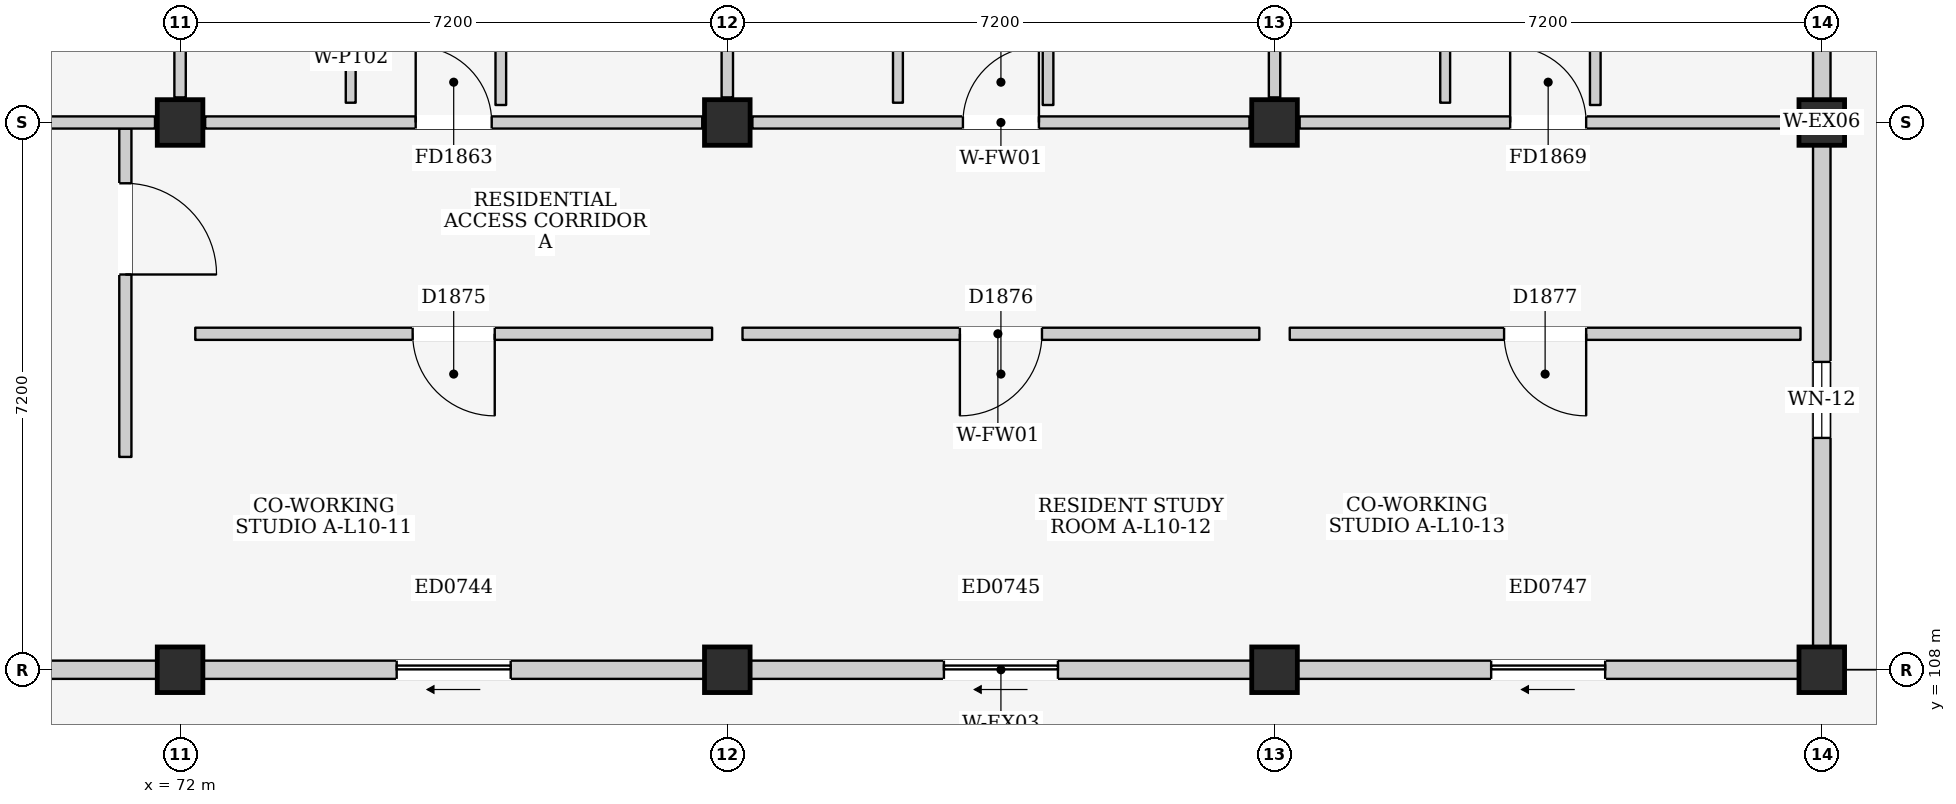
"""IFC4 building model, lengths in metres.
Left out: names, types, materials, properties, quantities, classifications, styles, units other than length and angle.
Written with IfcOpenShell. Run it as: python <this file> out.ifc"""

import sys

from ifc_helpers import new_model, si_unit, direction, frame, frame_2d, origin, origin_2d, place, context, subcontext, project, spatial, rectangle, extrude, element, fill, save


model = new_model("IFC4")
c1 = context("Model", 3, precision=1e-05, world=origin(), true_north=direction((0.0, 1.0)))
c2 = subcontext(c1, "Body", "Model", "MODEL_VIEW")
j1 = project(units=[si_unit("LENGTHUNIT", "METRE"), si_unit("PLANEANGLEUNIT", "RADIAN")], contexts=[c1])
p1 = place(None, origin())
s1 = spatial("IfcSite", under=j1, at=p1, CompositionType="ELEMENT")
p2 = place(p1, origin())
s2 = spatial("IfcBuilding", under=s1, at=p2, CompositionType="ELEMENT")
p3 = place(p2, frame((0.0, 0.0, 34.8)))
s3 = spatial("IfcBuildingStorey", under=s2, at=p3, CompositionType="ELEMENT", Elevation=34.8)
for number, where, z_axis, x_axis in (
    (1, (72.0, 108.0, 0.0), (0.0, 0.0, 1.0), (1.0, 0.0, 0.0)),
    (2, (72.0, 115.2, 0.0), (0.0, 0.0, 1.0), (1.0, 0.0, 0.0)),
    (3, (79.2, 108.0, 0.0), (0.0, 0.0, 1.0), (1.0, 0.0, 0.0)),
    (4, (79.2, 115.2, 0.0), (0.0, 0.0, 1.0), (1.0, 0.0, 0.0)),
    (5, (86.4, 108.0, 0.0), (0.0, 0.0, 1.0), (1.0, 0.0, 0.0)),
    (6, (86.4, 115.2, 0.0), (0.0, 0.0, 1.0), (1.0, 0.0, 0.0)),
    (7, (93.6, 108.0, 0.0), (0.0, 0.0, 1.0), (1.0, 0.0, 0.0)),
    (8, (93.6, 115.2, 0.0), (0.0, 0.0, 1.0), (1.0, 0.0, 0.0)),
):
    element("IfcColumn", number, at=place(p3, frame(where, z_axis=z_axis, x_axis=x_axis)), inside=s3, PredefinedType="COLUMN", context=c2, shape_type="SweptSolid", body=[
        extrude(rectangle(XDim=0.6, YDim=0.6, at=origin_2d()), origin(), (0.0, 0.0, 1.0), 3.2),
    ])
p4 = place(p3, frame((65.1, 108.0, 0.0), z_axis=(0.0, 0.0, 1.0), x_axis=(1.0, 0.0, 0.0)))
e9 = element("IfcWall", 9, at=p4, inside=s3, PredefinedType="ELEMENTEDWALL", context=c2, shape_type="SweptSolid", body=[
    extrude(rectangle(XDim=6.6, YDim=0.24, at=frame_2d((3.3, 0.0))), origin(), (0.0, 0.0, 1.0), 2.295),
])
p5 = place(p4, frame((2.8, 0.0, 1.2)))
e10 = element("IfcOpeningElement", 10, at=p5, cuts=e9, PredefinedType="OPENING", context=c2, shape_type="SweptSolid", body=[
    extrude(rectangle(XDim=1.0, YDim=0.9, at=frame_2d((0.5, 0.45))), frame((0.0, 0.135, 0.0), z_axis=(0.0, -1.0, 0.0), x_axis=(1.0, 0.0, 0.0)), (0.0, 0.0, 1.0), 0.27),
])
p6 = place(p3, frame((72.3, 108.0, 0.0), z_axis=(0.0, 0.0, 1.0), x_axis=(1.0, 0.0, 0.0)))
e11 = element("IfcWall", 11, at=p6, inside=s3, PredefinedType="ELEMENTEDWALL", context=c2, shape_type="SweptSolid", body=[
    extrude(rectangle(XDim=6.6, YDim=0.24, at=frame_2d((3.3, 0.0))), origin(), (0.0, 0.0, 1.0), 2.295),
])
p7 = place(p6, frame((2.55, 0.0, 0.0)))
e12 = element("IfcOpeningElement", 12, at=p7, cuts=e11, PredefinedType="OPENING", context=c2, shape_type="SweptSolid", body=[
    extrude(rectangle(XDim=1.5, YDim=2.12, at=frame_2d((0.75, 1.06))), frame((0.0, 0.135, 0.0), z_axis=(0.0, -1.0, 0.0), x_axis=(1.0, 0.0, 0.0)), (0.0, 0.0, 1.0), 0.27),
])
p8 = place(p3, frame((79.5, 108.0, 0.0), z_axis=(0.0, 0.0, 1.0), x_axis=(1.0, 0.0, 0.0)))
e13 = element("IfcWall", 13, at=p8, inside=s3, PredefinedType="ELEMENTEDWALL", context=c2, shape_type="SweptSolid", body=[
    extrude(rectangle(XDim=6.6, YDim=0.24, at=frame_2d((3.3, 0.0))), origin(), (0.0, 0.0, 1.0), 2.295),
])
p9 = place(p8, frame((2.55, 0.0, 0.0)))
e14 = element("IfcOpeningElement", 14, at=p9, cuts=e13, PredefinedType="OPENING", context=c2, shape_type="SweptSolid", body=[
    extrude(rectangle(XDim=1.5, YDim=2.12, at=frame_2d((0.75, 1.06))), frame((0.0, 0.135, 0.0), z_axis=(0.0, -1.0, 0.0), x_axis=(1.0, 0.0, 0.0)), (0.0, 0.0, 1.0), 0.27),
])
p10 = place(p3, frame((86.7, 108.0, 0.0), z_axis=(0.0, 0.0, 1.0), x_axis=(1.0, 0.0, 0.0)))
e15 = element("IfcWall", 15, at=p10, inside=s3, PredefinedType="ELEMENTEDWALL", context=c2, shape_type="SweptSolid", body=[
    extrude(rectangle(XDim=6.6, YDim=0.24, at=frame_2d((3.3, 0.0))), origin(), (0.0, 0.0, 1.0), 2.295),
])
p11 = place(p10, frame((2.55, 0.0, 0.0)))
e16 = element("IfcOpeningElement", 16, at=p11, cuts=e15, PredefinedType="OPENING", context=c2, shape_type="SweptSolid", body=[
    extrude(rectangle(XDim=1.5, YDim=2.12, at=frame_2d((0.75, 1.06))), frame((0.0, 0.135, 0.0), z_axis=(0.0, -1.0, 0.0), x_axis=(1.0, 0.0, 0.0)), (0.0, 0.0, 1.0), 0.27),
])
p12 = place(p3, frame((93.6, 108.3, 0.0), z_axis=(0.0, 0.0, 1.0), x_axis=(0.0, 1.0, 0.0)))
e17 = element("IfcWall", 17, at=p12, inside=s3, PredefinedType="ELEMENTEDWALL", context=c2, shape_type="SweptSolid", body=[
    extrude(rectangle(XDim=6.6, YDim=0.23, at=frame_2d((3.3, 0.0))), origin(), (0.0, 0.0, 1.0), 2.445),
])
p13 = place(p12, frame((2.75, 0.0, 1.1)))
e18 = element("IfcOpeningElement", 18, at=p13, cuts=e17, PredefinedType="OPENING", context=c2, shape_type="SweptSolid", body=[
    extrude(rectangle(XDim=1.0, YDim=0.9, at=frame_2d((0.5, 0.45))), frame((0.0, 0.13, 0.0), z_axis=(0.0, -1.0, 0.0), x_axis=(1.0, 0.0, 0.0)), (0.0, 0.0, 1.0), 0.26),
])
p14 = place(p3, frame((93.6, 115.5, 0.0), z_axis=(0.0, 0.0, 1.0), x_axis=(0.0, 1.0, 0.0)))
e19 = element("IfcWall", 19, at=p14, inside=s3, PredefinedType="ELEMENTEDWALL", context=c2, shape_type="SweptSolid", body=[
    extrude(rectangle(XDim=6.6, YDim=0.23, at=frame_2d((3.3, 0.0))), origin(), (0.0, 0.0, 1.0), 2.445),
])
p15 = place(p14, frame((3.6, 0.0, 0.0)))
e20 = element("IfcOpeningElement", 20, at=p15, cuts=e19, PredefinedType="OPENING", context=c2, shape_type="SweptSolid", body=[
    extrude(rectangle(XDim=1.08, YDim=2.12, at=frame_2d((0.54, 1.06))), frame((0.0, 0.13, 0.0), z_axis=(0.0, -1.0, 0.0), x_axis=(1.0, 0.0, 0.0)), (0.0, 0.0, 1.0), 0.26),
])
p16 = place(p3, frame((71.28, 110.8, 0.0), z_axis=(0.0, 0.0, 1.0), x_axis=(0.0, 1.0, 0.0)))
e21 = element("IfcWall", 21, at=p16, inside=s3, PredefinedType="PARTITIONING", context=c2, shape_type="SweptSolid", body=[
    extrude(rectangle(XDim=4.32, YDim=0.16, at=frame_2d((2.16, 0.0))), origin(), (0.0, 0.0, 1.0), 2.96),
])
p17 = place(p16, frame((2.4, 0.0, 0.0)))
e22 = element("IfcOpeningElement", 22, at=p17, cuts=e21, PredefinedType="OPENING", context=c2, shape_type="SweptSolid", body=[
    extrude(rectangle(XDim=1.2, YDim=2.2, at=frame_2d((0.6, 1.1))), frame((0.0, 0.095, 0.0), z_axis=(0.0, -1.0, 0.0), x_axis=(1.0, 0.0, 0.0)), (0.0, 0.0, 1.0), 0.19),
])
p18 = place(p3, frame((65.13, 115.2, 0.0), z_axis=(0.0, 0.0, 1.0), x_axis=(1.0, 0.0, 0.0)))
e23 = element("IfcWall", 23, at=p18, inside=s3, PredefinedType="PARTITIONING", context=c2, shape_type="SweptSolid", body=[
    extrude(rectangle(XDim=6.54, YDim=0.16, at=frame_2d((3.27, 0.0))), origin(), (0.0, 0.0, 1.0), 2.295),
])
p19 = place(p18, frame((2.77, 0.0, 0.0)))
e24 = element("IfcOpeningElement", 24, at=p19, cuts=e23, PredefinedType="OPENING", context=c2, shape_type="SweptSolid", body=[
    extrude(rectangle(XDim=1.0, YDim=2.15, at=frame_2d((0.5, 1.075))), frame((0.0, 0.095, 0.0), z_axis=(0.0, -1.0, 0.0), x_axis=(1.0, 0.0, 0.0)), (0.0, 0.0, 1.0), 0.19),
])
p20 = place(p3, frame((72.0, 115.53, 0.0), z_axis=(0.0, 0.0, 1.0), x_axis=(0.0, 1.0, 0.0)))
e25 = element("IfcWall", 25, at=p20, inside=s3, PredefinedType="PARTITIONING", context=c2, shape_type="SweptSolid", body=[
    extrude(rectangle(XDim=6.54, YDim=0.15, at=frame_2d((3.27, 0.0))), origin(), (0.0, 0.0, 1.0), 2.445),
])
p21 = place(p3, frame((72.33, 115.2, 0.0), z_axis=(0.0, 0.0, 1.0), x_axis=(1.0, 0.0, 0.0)))
e26 = element("IfcWall", 26, at=p21, inside=s3, PredefinedType="PARTITIONING", context=c2, shape_type="SweptSolid", body=[
    extrude(rectangle(XDim=6.54, YDim=0.16, at=frame_2d((3.27, 0.0))), origin(), (0.0, 0.0, 1.0), 2.295),
])
p22 = place(p21, frame((2.77, 0.0, 0.0)))
e27 = element("IfcOpeningElement", 27, at=p22, cuts=e26, PredefinedType="OPENING", context=c2, shape_type="SweptSolid", body=[
    extrude(rectangle(XDim=1.0, YDim=2.15, at=frame_2d((0.5, 1.075))), frame((0.0, 0.095, 0.0), z_axis=(0.0, -1.0, 0.0), x_axis=(1.0, 0.0, 0.0)), (0.0, 0.0, 1.0), 0.19),
])
p23 = place(p3, frame((79.2, 115.53, 0.0), z_axis=(0.0, 0.0, 1.0), x_axis=(0.0, 1.0, 0.0)))
e28 = element("IfcWall", 28, at=p23, inside=s3, PredefinedType="PARTITIONING", context=c2, shape_type="SweptSolid", body=[
    extrude(rectangle(XDim=6.54, YDim=0.15, at=frame_2d((3.27, 0.0))), origin(), (0.0, 0.0, 1.0), 2.445),
])
p24 = place(p3, frame((74.245, 115.46, 0.0), z_axis=(0.0, 0.0, 1.0), x_axis=(0.0, 1.0, 0.0)))
e29 = element("IfcWall", 29, at=p24, inside=s3, PredefinedType="PARTITIONING", context=c2, shape_type="SweptSolid", body=[
    extrude(rectangle(XDim=2.13, YDim=0.13, at=frame_2d((1.065, 0.0))), origin(), (0.0, 0.0, 1.0), 2.96),
])
p25 = place(p3, frame((76.22, 115.43, 0.0), z_axis=(0.0, 0.0, 1.0), x_axis=(0.0, 1.0, 0.0)))
e30 = element("IfcWall", 30, at=p25, inside=s3, PredefinedType="PARTITIONING", context=c2, shape_type="SweptSolid", body=[
    extrude(rectangle(XDim=2.15, YDim=0.14, at=frame_2d((1.075, 0.0))), origin(), (0.0, 0.0, 1.0), 2.96),
])
p26 = place(p3, frame((79.53, 115.2, 0.0), z_axis=(0.0, 0.0, 1.0), x_axis=(1.0, 0.0, 0.0)))
e31 = element("IfcWall", 31, at=p26, inside=s3, PredefinedType="PARTITIONING", context=c2, shape_type="SweptSolid", body=[
    extrude(rectangle(XDim=6.54, YDim=0.16, at=frame_2d((3.27, 0.0))), origin(), (0.0, 0.0, 1.0), 2.295),
])
p27 = place(p26, frame((2.77, 0.0, 0.0)))
e32 = element("IfcOpeningElement", 32, at=p27, cuts=e31, PredefinedType="OPENING", context=c2, shape_type="SweptSolid", body=[
    extrude(rectangle(XDim=1.0, YDim=2.15, at=frame_2d((0.5, 1.075))), frame((0.0, 0.095, 0.0), z_axis=(0.0, -1.0, 0.0), x_axis=(1.0, 0.0, 0.0)), (0.0, 0.0, 1.0), 0.19),
])
p28 = place(p3, frame((86.4, 115.53, 0.0), z_axis=(0.0, 0.0, 1.0), x_axis=(0.0, 1.0, 0.0)))
e33 = element("IfcWall", 33, at=p28, inside=s3, PredefinedType="PARTITIONING", context=c2, shape_type="SweptSolid", body=[
    extrude(rectangle(XDim=6.54, YDim=0.15, at=frame_2d((3.27, 0.0))), origin(), (0.0, 0.0, 1.0), 2.445),
])
p29 = place(p3, frame((81.445, 115.46, 0.0), z_axis=(0.0, 0.0, 1.0), x_axis=(0.0, 1.0, 0.0)))
e34 = element("IfcWall", 34, at=p29, inside=s3, PredefinedType="PARTITIONING", context=c2, shape_type="SweptSolid", body=[
    extrude(rectangle(XDim=2.13, YDim=0.13, at=frame_2d((1.065, 0.0))), origin(), (0.0, 0.0, 1.0), 2.96),
])
p30 = place(p3, frame((83.42, 115.43, 0.0), z_axis=(0.0, 0.0, 1.0), x_axis=(0.0, 1.0, 0.0)))
e35 = element("IfcWall", 35, at=p30, inside=s3, PredefinedType="PARTITIONING", context=c2, shape_type="SweptSolid", body=[
    extrude(rectangle(XDim=2.15, YDim=0.14, at=frame_2d((1.075, 0.0))), origin(), (0.0, 0.0, 1.0), 2.96),
])
p31 = place(p3, frame((86.73, 115.2, 0.0), z_axis=(0.0, 0.0, 1.0), x_axis=(1.0, 0.0, 0.0)))
e36 = element("IfcWall", 36, at=p31, inside=s3, PredefinedType="PARTITIONING", context=c2, shape_type="SweptSolid", body=[
    extrude(rectangle(XDim=6.54, YDim=0.16, at=frame_2d((3.27, 0.0))), origin(), (0.0, 0.0, 1.0), 2.295),
])
p32 = place(p31, frame((2.77, 0.0, 0.0)))
e37 = element("IfcOpeningElement", 37, at=p32, cuts=e36, PredefinedType="OPENING", context=c2, shape_type="SweptSolid", body=[
    extrude(rectangle(XDim=1.0, YDim=2.15, at=frame_2d((0.5, 1.075))), frame((0.0, 0.095, 0.0), z_axis=(0.0, -1.0, 0.0), x_axis=(1.0, 0.0, 0.0)), (0.0, 0.0, 1.0), 0.19),
])
p33 = place(p3, frame((88.645, 115.46, 0.0), z_axis=(0.0, 0.0, 1.0), x_axis=(0.0, 1.0, 0.0)))
e38 = element("IfcWall", 38, at=p33, inside=s3, PredefinedType="PARTITIONING", context=c2, shape_type="SweptSolid", body=[
    extrude(rectangle(XDim=2.13, YDim=0.13, at=frame_2d((1.065, 0.0))), origin(), (0.0, 0.0, 1.0), 2.96),
])
p34 = place(p3, frame((90.62, 115.43, 0.0), z_axis=(0.0, 0.0, 1.0), x_axis=(0.0, 1.0, 0.0)))
e39 = element("IfcWall", 39, at=p34, inside=s3, PredefinedType="PARTITIONING", context=c2, shape_type="SweptSolid", body=[
    extrude(rectangle(XDim=2.15, YDim=0.14, at=frame_2d((1.075, 0.0))), origin(), (0.0, 0.0, 1.0), 2.96),
])
p35 = place(p3, frame((72.2, 112.42, 0.0), z_axis=(0.0, 0.0, 1.0), x_axis=(1.0, 0.0, 0.0)))
e40 = element("IfcWall", 40, at=p35, inside=s3, PredefinedType="PARTITIONING", context=c2, shape_type="SweptSolid", body=[
    extrude(rectangle(XDim=6.8, YDim=0.16, at=frame_2d((3.4, 0.0))), origin(), (0.0, 0.0, 1.0), 2.96),
])
p36 = place(p35, frame((2.86, 0.0, 0.0)))
e41 = element("IfcOpeningElement", 41, at=p36, cuts=e40, PredefinedType="OPENING", context=c2, shape_type="SweptSolid", body=[
    extrude(rectangle(XDim=1.08, YDim=2.22, at=frame_2d((0.54, 1.11))), frame((0.0, 0.095, 0.0), z_axis=(0.0, -1.0, 0.0), x_axis=(1.0, 0.0, 0.0)), (0.0, 0.0, 1.0), 0.19),
])
p37 = place(p3, frame((79.4, 112.42, 0.0), z_axis=(0.0, 0.0, 1.0), x_axis=(1.0, 0.0, 0.0)))
e42 = element("IfcWall", 42, at=p37, inside=s3, PredefinedType="PARTITIONING", context=c2, shape_type="SweptSolid", body=[
    extrude(rectangle(XDim=6.8, YDim=0.16, at=frame_2d((3.4, 0.0))), origin(), (0.0, 0.0, 1.0), 2.96),
])
p38 = place(p37, frame((2.86, 0.0, 0.0)))
e43 = element("IfcOpeningElement", 43, at=p38, cuts=e42, PredefinedType="OPENING", context=c2, shape_type="SweptSolid", body=[
    extrude(rectangle(XDim=1.08, YDim=2.22, at=frame_2d((0.54, 1.11))), frame((0.0, 0.095, 0.0), z_axis=(0.0, -1.0, 0.0), x_axis=(1.0, 0.0, 0.0)), (0.0, 0.0, 1.0), 0.19),
])
p39 = place(p3, frame((86.6, 112.42, 0.0), z_axis=(0.0, 0.0, 1.0), x_axis=(1.0, 0.0, 0.0)))
e44 = element("IfcWall", 44, at=p39, inside=s3, PredefinedType="PARTITIONING", context=c2, shape_type="SweptSolid", body=[
    extrude(rectangle(XDim=6.72, YDim=0.16, at=frame_2d((3.36, 0.0))), origin(), (0.0, 0.0, 1.0), 2.96),
])
p40 = place(p39, frame((2.82, 0.0, 0.0)))
e45 = element("IfcOpeningElement", 45, at=p40, cuts=e44, PredefinedType="OPENING", context=c2, shape_type="SweptSolid", body=[
    extrude(rectangle(XDim=1.08, YDim=2.22, at=frame_2d((0.54, 1.11))), frame((0.0, 0.095, 0.0), z_axis=(0.0, -1.0, 0.0), x_axis=(1.0, 0.0, 0.0)), (0.0, 0.0, 1.0), 0.19),
])
p41 = place(p7, frame((1.5, 0.0, 0.0), z_axis=(0.0, 0.0, 1.0), x_axis=(-1.0, 0.0, 0.0)))
e46 = element("IfcDoor", 46, at=p41, inside=s3, OperationType="SLIDING_TO_LEFT", PredefinedType="DOOR", context=c2, shape_type="SweptSolid", body=[
    extrude(rectangle(XDim=1.5, YDim=2.12, at=frame_2d((0.75, 1.06))), frame((0.0, 0.025, 0.0), z_axis=(0.0, -1.0, 0.0), x_axis=(1.0, 0.0, 0.0)), (0.0, 0.0, 1.0), 0.05),
])
fill(e12, e46)
p42 = place(p9, frame((1.5, 0.0, 0.0), z_axis=(0.0, 0.0, 1.0), x_axis=(-1.0, 0.0, 0.0)))
e47 = element("IfcDoor", 47, at=p42, inside=s3, OperationType="SLIDING_TO_LEFT", PredefinedType="DOOR", context=c2, shape_type="SweptSolid", body=[
    extrude(rectangle(XDim=1.5, YDim=2.12, at=frame_2d((0.75, 1.06))), frame((0.0, 0.025, 0.0), z_axis=(0.0, -1.0, 0.0), x_axis=(1.0, 0.0, 0.0)), (0.0, 0.0, 1.0), 0.05),
])
fill(e14, e47)
p43 = place(p11, frame((1.5, 0.0, 0.0), z_axis=(0.0, 0.0, 1.0), x_axis=(-1.0, 0.0, 0.0)))
e48 = element("IfcDoor", 48, at=p43, inside=s3, OperationType="SLIDING_TO_LEFT", PredefinedType="DOOR", context=c2, shape_type="SweptSolid", body=[
    extrude(rectangle(XDim=1.5, YDim=2.12, at=frame_2d((0.75, 1.06))), frame((0.0, 0.025, 0.0), z_axis=(0.0, -1.0, 0.0), x_axis=(1.0, 0.0, 0.0)), (0.0, 0.0, 1.0), 0.05),
])
fill(e16, e48)
p44 = place(p13, origin())
e49 = element("IfcWindow", 49, at=p44, inside=s3, PartitioningType="SINGLE_PANEL", PredefinedType="WINDOW", context=c2, shape_type="SweptSolid", body=[
    extrude(rectangle(XDim=1.0, YDim=0.9, at=frame_2d((0.5, 0.45))), frame((0.0, 0.03, 0.0), z_axis=(0.0, -1.0, 0.0), x_axis=(1.0, 0.0, 0.0)), (0.0, 0.0, 1.0), 0.06),
])
fill(e18, e49)
p45 = place(p17, frame((1.2, 0.0, 0.0), z_axis=(0.0, 0.0, 1.0), x_axis=(-1.0, 0.0, 0.0)))
e50 = element("IfcDoor", 50, at=p45, inside=s3, OperationType="SINGLE_SWING_RIGHT", PredefinedType="DOOR", context=c2, shape_type="SweptSolid", body=[
    extrude(rectangle(XDim=1.2, YDim=2.2, at=frame_2d((0.6, 1.1))), frame((0.0, 0.025, 0.0), z_axis=(0.0, -1.0, 0.0), x_axis=(1.0, 0.0, 0.0)), (0.0, 0.0, 1.0), 0.05),
])
fill(e22, e50)
p46 = place(p22, origin())
e51 = element("IfcDoor", 51, at=p46, inside=s3, OperationType="SINGLE_SWING_LEFT", PredefinedType="DOOR", context=c2, shape_type="SweptSolid", body=[
    extrude(rectangle(XDim=1.0, YDim=2.15, at=frame_2d((0.5, 1.075))), frame((0.0, 0.025, 0.0), z_axis=(0.0, -1.0, 0.0), x_axis=(1.0, 0.0, 0.0)), (0.0, 0.0, 1.0), 0.05),
])
fill(e27, e51)
p47 = place(p27, origin())
e52 = element("IfcDoor", 52, at=p47, inside=s3, OperationType="SINGLE_SWING_RIGHT", PredefinedType="DOOR", context=c2, shape_type="SweptSolid", body=[
    extrude(rectangle(XDim=1.0, YDim=2.15, at=frame_2d((0.5, 1.075))), frame((0.0, 0.025, 0.0), z_axis=(0.0, -1.0, 0.0), x_axis=(1.0, 0.0, 0.0)), (0.0, 0.0, 1.0), 0.05),
])
fill(e32, e52)
p48 = place(p32, origin())
e53 = element("IfcDoor", 53, at=p48, inside=s3, OperationType="SINGLE_SWING_LEFT", PredefinedType="DOOR", context=c2, shape_type="SweptSolid", body=[
    extrude(rectangle(XDim=1.0, YDim=2.15, at=frame_2d((0.5, 1.075))), frame((0.0, 0.025, 0.0), z_axis=(0.0, -1.0, 0.0), x_axis=(1.0, 0.0, 0.0)), (0.0, 0.0, 1.0), 0.05),
])
fill(e37, e53)
p49 = place(p36, frame((1.08, 0.0, 0.0), z_axis=(0.0, 0.0, 1.0), x_axis=(-1.0, 0.0, 0.0)))
e54 = element("IfcDoor", 54, at=p49, inside=s3, OperationType="SINGLE_SWING_LEFT", PredefinedType="DOOR", context=c2, shape_type="SweptSolid", body=[
    extrude(rectangle(XDim=1.08, YDim=2.22, at=frame_2d((0.54, 1.11))), frame((0.0, 0.025, 0.0), z_axis=(0.0, -1.0, 0.0), x_axis=(1.0, 0.0, 0.0)), (0.0, 0.0, 1.0), 0.05),
])
fill(e41, e54)
p50 = place(p38, frame((1.08, 0.0, 0.0), z_axis=(0.0, 0.0, 1.0), x_axis=(-1.0, 0.0, 0.0)))
e55 = element("IfcDoor", 55, at=p50, inside=s3, OperationType="SINGLE_SWING_RIGHT", PredefinedType="DOOR", context=c2, shape_type="SweptSolid", body=[
    extrude(rectangle(XDim=1.08, YDim=2.22, at=frame_2d((0.54, 1.11))), frame((0.0, 0.025, 0.0), z_axis=(0.0, -1.0, 0.0), x_axis=(1.0, 0.0, 0.0)), (0.0, 0.0, 1.0), 0.05),
])
fill(e43, e55)
p51 = place(p40, frame((1.08, 0.0, 0.0), z_axis=(0.0, 0.0, 1.0), x_axis=(-1.0, 0.0, 0.0)))
e56 = element("IfcDoor", 56, at=p51, inside=s3, OperationType="SINGLE_SWING_LEFT", PredefinedType="DOOR", context=c2, shape_type="SweptSolid", body=[
    extrude(rectangle(XDim=1.08, YDim=2.22, at=frame_2d((0.54, 1.11))), frame((0.0, 0.025, 0.0), z_axis=(0.0, -1.0, 0.0), x_axis=(1.0, 0.0, 0.0)), (0.0, 0.0, 1.0), 0.05),
])
fill(e45, e56)
save(model, sys.argv[1])
